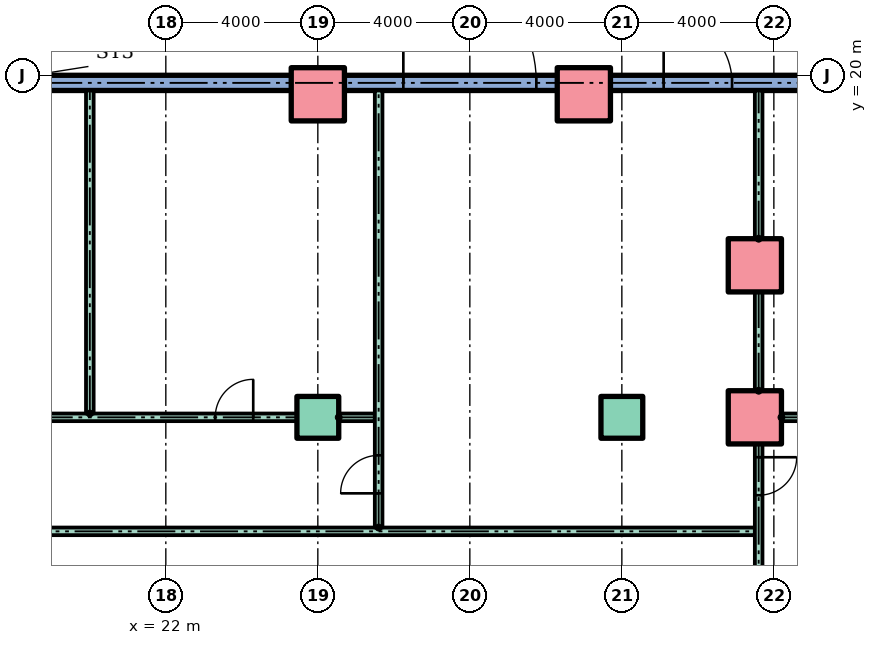
"""IFC4 building model, lengths in metres.
Left out: names, types, materials, properties, quantities, classifications, styles, units other than length and angle.
Written with IfcOpenShell. Run it as: python <this file> out.ifc"""

import sys

from ifc_helpers import new_model, si_unit, direction, frame, frame_2d, origin, origin_2d, place, context, subcontext, project, spatial, rectangle, hollow_rectangle, extrude, element, fill, save


model = new_model("IFC4")
c1 = context("Model", 3, precision=1e-05, world=origin(), true_north=direction((0.0, 1.0)))
c2 = subcontext(c1, "Body", "Model", "MODEL_VIEW")
j1 = project(units=[si_unit("LENGTHUNIT", "METRE"), si_unit("PLANEANGLEUNIT", "RADIAN")], contexts=[c1])
p1 = place(None, origin())
s1 = spatial("IfcSite", under=j1, at=p1, CompositionType="ELEMENT")
p2 = place(p1, origin())
s2 = spatial("IfcBuilding", under=s1, at=p2, CompositionType="ELEMENT")
p3 = place(p2, origin())
s3 = spatial("IfcBuildingStorey", under=s2, at=p3, CompositionType="ELEMENT", Elevation=0.0)
for number, where in (
    (1, (26.0, 11.0, 0.0)),
    (2, (34.0, 11.0, 0.0)),
):
    element("IfcColumn", number, at=place(p3, frame(where)), inside=s3, PredefinedType="COLUMN", context=c2, shape_type="SweptSolid", body=[
        extrude(rectangle(XDim=1.1, YDim=1.1, at=origin_2d()), origin(), (0.0, 0.0, 1.0), 6.0),
    ])
for number, where in (
    (3, (37.5, 11.0, 0.0)),
    (4, (37.5, 15.0, 0.0)),
    (5, (26.0, 19.5, 0.0)),
    (6, (33.0, 19.5, 0.0)),
):
    element("IfcColumn", number, at=place(p3, frame(where)), inside=s3, PredefinedType="COLUMN", context=c2, shape_type="SweptSolid", body=[
        extrude(hollow_rectangle(XDim=1.4, YDim=1.4, WallThickness=0.08, at=origin_2d()), origin(), (0.0, 0.0, 1.0), 6.0),
    ])
p4 = place(p3, frame((39.6, 19.8, 0.0), z_axis=(0.0, 0.0, 1.0), x_axis=(-1.0, 0.0, 0.0)))
e7 = element("IfcWall", 7, at=p4, inside=s3, PredefinedType="STANDARD", context=c2, shape_type="SweptSolid", body=[
    extrude(rectangle(XDim=25.6, YDim=0.4, at=frame_2d((12.8, 0.0))), origin(), (0.0, 0.0, 1.0), 5.7),
])
p5 = place(p4, frame((2.7, 0.0, 0.0)))
e8 = element("IfcOpeningElement", 8, at=p5, cuts=e7, PredefinedType="OPENING", context=c2, shape_type="SweptSolid", body=[
    extrude(rectangle(XDim=1.8, YDim=2.4, at=frame_2d((0.9, 1.2))), frame((0.0, 0.21, 0.0), z_axis=(0.0, -1.0, 0.0), x_axis=(1.0, 0.0, 0.0)), (0.0, 0.0, 1.0), 0.42),
])
p6 = place(p4, frame((22.69, 0.0, 0.9)))
e9 = element("IfcOpeningElement", 9, at=p6, cuts=e7, PredefinedType="OPENING", context=c2, shape_type="SweptSolid", body=[
    extrude(rectangle(XDim=2.4, YDim=2.4, at=frame_2d((1.2, 1.2))), frame((0.0, 0.21, 0.0), z_axis=(0.0, -1.0, 0.0), x_axis=(1.0, 0.0, 0.0)), (0.0, 0.0, 1.0), 0.42),
])
p7 = place(p4, frame((7.85, 0.0, 0.0)))
e10 = element("IfcOpeningElement", 10, at=p7, cuts=e7, PredefinedType="OPENING", context=c2, shape_type="SweptSolid", body=[
    extrude(rectangle(XDim=3.5, YDim=4.5, at=frame_2d((1.75, 2.25))), frame((0.0, 0.21, 0.0), z_axis=(0.0, -1.0, 0.0), x_axis=(1.0, 0.0, 0.0)), (0.0, 0.0, 1.0), 0.42),
])
p8 = place(p3, frame((16.3, 8.0, 0.0)))
e11 = element("IfcWall", 11, at=p8, inside=s3, PredefinedType="PARTITIONING", context=c2, shape_type="SweptSolid", body=[
    extrude(rectangle(XDim=21.2, YDim=0.2, at=frame_2d((10.6, 0.0))), origin(), (0.0, 0.0, 1.0), 5.7),
])
p9 = place(p3, frame((18.55, 11.0, 0.0)))
e12 = element("IfcWall", 12, at=p9, inside=s3, PredefinedType="PARTITIONING", context=c2, shape_type="SweptSolid", body=[
    extrude(rectangle(XDim=6.9, YDim=0.2, at=frame_2d((3.45, 0.0))), origin(), (0.0, 0.0, 1.0), 5.7),
])
p10 = place(p9, frame((4.75, 0.0, 0.0)))
e13 = element("IfcOpeningElement", 13, at=p10, cuts=e12, PredefinedType="OPENING", context=c2, shape_type="SweptSolid", body=[
    extrude(rectangle(XDim=1.0, YDim=2.1, at=frame_2d((0.5, 1.05))), frame((0.0, 0.11, 0.0), z_axis=(0.0, -1.0, 0.0), x_axis=(1.0, 0.0, 0.0)), (0.0, 0.0, 1.0), 0.22),
])
p11 = place(p3, frame((26.55, 11.0, 0.0)))
e14 = element("IfcWall", 14, at=p11, inside=s3, PredefinedType="PARTITIONING", context=c2, shape_type="SweptSolid", body=[
    extrude(rectangle(XDim=0.95, YDim=0.2, at=frame_2d((0.475, 0.0))), origin(), (0.0, 0.0, 1.0), 5.7),
])
p12 = place(p3, frame((38.2, 11.0, 0.0)))
e15 = element("IfcWall", 15, at=p12, inside=s3, PredefinedType="PARTITIONING", context=c2, shape_type="SweptSolid", body=[
    extrude(rectangle(XDim=1.4, YDim=0.2, at=frame_2d((0.7, 0.0))), origin(), (0.0, 0.0, 1.0), 5.7),
])
p13 = place(p3, frame((20.0, 11.1, 0.0), z_axis=(0.0, 0.0, 1.0), x_axis=(0.0, 1.0, 0.0)))
e16 = element("IfcWall", 16, at=p13, inside=s3, PredefinedType="PARTITIONING", context=c2, shape_type="SweptSolid", body=[
    extrude(rectangle(XDim=8.5, YDim=0.2, at=frame_2d((4.25, 0.0))), origin(), (0.0, 0.0, 1.0), 5.7),
])
p14 = place(p3, frame((27.6, 8.1, 0.0), z_axis=(0.0, 0.0, 1.0), x_axis=(0.0, 1.0, 0.0)))
e17 = element("IfcWall", 17, at=p14, inside=s3, PredefinedType="PARTITIONING", context=c2, shape_type="SweptSolid", body=[
    extrude(rectangle(XDim=11.5, YDim=0.2, at=frame_2d((5.75, 0.0))), origin(), (0.0, 0.0, 1.0), 5.7),
])
p15 = place(p14, frame((0.9, 0.0, 0.0)))
e18 = element("IfcOpeningElement", 18, at=p15, cuts=e17, PredefinedType="OPENING", context=c2, shape_type="SweptSolid", body=[
    extrude(rectangle(XDim=1.0, YDim=2.1, at=frame_2d((0.5, 1.05))), frame((0.0, 0.11, 0.0), z_axis=(0.0, -1.0, 0.0), x_axis=(1.0, 0.0, 0.0)), (0.0, 0.0, 1.0), 0.22),
])
p16 = place(p3, frame((37.6, 2.7, 0.0), z_axis=(0.0, 0.0, 1.0), x_axis=(0.0, 1.0, 0.0)))
e19 = element("IfcWall", 19, at=p16, inside=s3, PredefinedType="PARTITIONING", context=c2, shape_type="SweptSolid", body=[
    extrude(rectangle(XDim=7.6, YDim=0.2, at=frame_2d((3.8, 0.0))), origin(), (0.0, 0.0, 1.0), 5.7),
])
p17 = place(p16, frame((6.25, 0.0, 0.0)))
e20 = element("IfcOpeningElement", 20, at=p17, cuts=e19, PredefinedType="OPENING", context=c2, shape_type="SweptSolid", body=[
    extrude(rectangle(XDim=1.0, YDim=2.1, at=frame_2d((0.5, 1.05))), frame((0.0, 0.11, 0.0), z_axis=(0.0, -1.0, 0.0), x_axis=(1.0, 0.0, 0.0)), (0.0, 0.0, 1.0), 0.22),
])
p18 = place(p3, frame((37.6, 11.7, 0.0), z_axis=(0.0, 0.0, 1.0), x_axis=(0.0, 1.0, 0.0)))
e21 = element("IfcWall", 21, at=p18, inside=s3, PredefinedType="PARTITIONING", context=c2, shape_type="SweptSolid", body=[
    extrude(rectangle(XDim=2.6, YDim=0.2, at=frame_2d((1.3, 0.0))), origin(), (0.0, 0.0, 1.0), 5.7),
])
p19 = place(p3, frame((37.6, 15.7, 0.0), z_axis=(0.0, 0.0, 1.0), x_axis=(0.0, 1.0, 0.0)))
e22 = element("IfcWall", 22, at=p19, inside=s3, PredefinedType="PARTITIONING", context=c2, shape_type="SweptSolid", body=[
    extrude(rectangle(XDim=3.9, YDim=0.2, at=frame_2d((1.95, 0.0))), origin(), (0.0, 0.0, 1.0), 5.7),
])
p20 = place(p5, frame((1.8, 0.0, 0.0), z_axis=(0.0, 0.0, 1.0), x_axis=(-1.0, 0.0, 0.0)))
e23 = element("IfcDoor", 23, at=p20, inside=s3, OperationType="DOUBLE_DOOR_SINGLE_SWING", PredefinedType="DOOR", context=c2, shape_type="SweptSolid", body=[
    extrude(rectangle(XDim=1.8, YDim=2.4, at=frame_2d((0.9, 1.2))), frame((0.0, 0.025, 0.0), z_axis=(0.0, -1.0, 0.0), x_axis=(1.0, 0.0, 0.0)), (0.0, 0.0, 1.0), 0.05),
])
fill(e8, e23)
p21 = place(p17, frame((1.0, 0.0, 0.0), z_axis=(0.0, 0.0, 1.0), x_axis=(-1.0, 0.0, 0.0)))
e24 = element("IfcDoor", 24, at=p21, inside=s3, OperationType="SINGLE_SWING_RIGHT", PredefinedType="DOOR", context=c2, shape_type="SweptSolid", body=[
    extrude(rectangle(XDim=1.0, YDim=2.1, at=frame_2d((0.5, 1.05))), frame((0.0, 0.025, 0.0), z_axis=(0.0, -1.0, 0.0), x_axis=(1.0, 0.0, 0.0)), (0.0, 0.0, 1.0), 0.05),
])
fill(e20, e24)
p22 = place(p15, origin())
e25 = element("IfcDoor", 25, at=p22, inside=s3, OperationType="SINGLE_SWING_LEFT", PredefinedType="DOOR", context=c2, shape_type="SweptSolid", body=[
    extrude(rectangle(XDim=1.0, YDim=2.1, at=frame_2d((0.5, 1.05))), frame((0.0, 0.025, 0.0), z_axis=(0.0, -1.0, 0.0), x_axis=(1.0, 0.0, 0.0)), (0.0, 0.0, 1.0), 0.05),
])
fill(e18, e25)
p23 = place(p10, origin())
e26 = element("IfcDoor", 26, at=p23, inside=s3, OperationType="SINGLE_SWING_RIGHT", PredefinedType="DOOR", context=c2, shape_type="SweptSolid", body=[
    extrude(rectangle(XDim=1.0, YDim=2.1, at=frame_2d((0.5, 1.05))), frame((0.0, 0.025, 0.0), z_axis=(0.0, -1.0, 0.0), x_axis=(1.0, 0.0, 0.0)), (0.0, 0.0, 1.0), 0.05),
])
fill(e13, e26)
p24 = place(p7, frame((3.5, 0.0, 0.0), z_axis=(0.0, 0.0, 1.0), x_axis=(-1.0, 0.0, 0.0)))
e27 = element("IfcDoor", 27, at=p24, inside=s3, OperationType="DOUBLE_DOOR_SINGLE_SWING", PredefinedType="DOOR", context=c2, shape_type="SweptSolid", body=[
    extrude(rectangle(XDim=3.5, YDim=4.5, at=frame_2d((1.75, 2.25))), frame((0.0, 0.025, 0.0), z_axis=(0.0, -1.0, 0.0), x_axis=(1.0, 0.0, 0.0)), (0.0, 0.0, 1.0), 0.05),
])
fill(e10, e27)
save(model, sys.argv[1])
